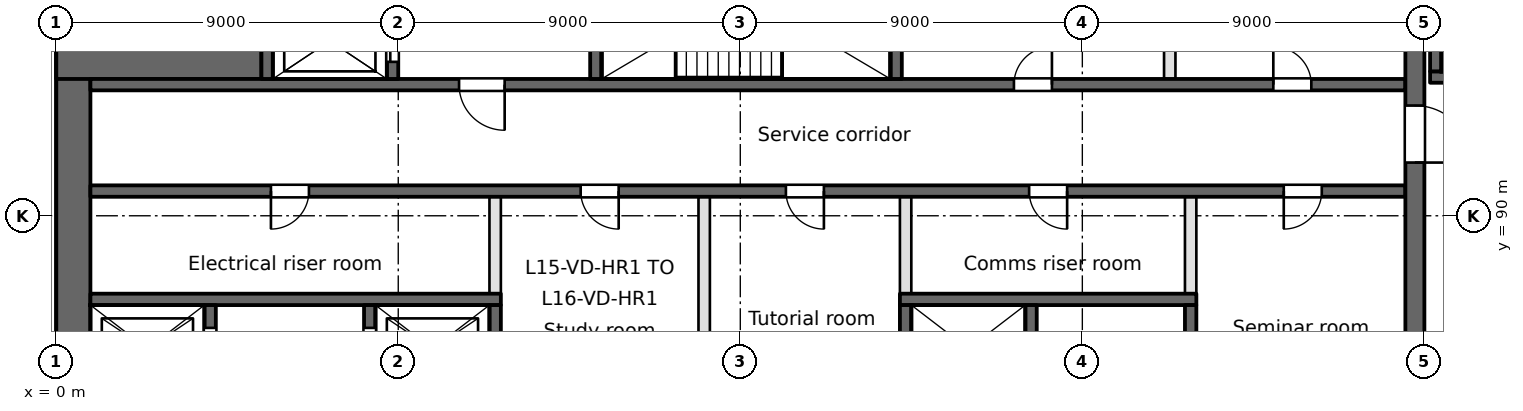
"""IFC4 building model, lengths in metres.
Left out: names, types, materials, properties, quantities, classifications, styles, units other than length and angle.
Written with IfcOpenShell. Run it as: python <this file> out.ifc"""

import sys

from ifc_helpers import new_model, si_unit, direction, frame, frame_2d, origin, place, context, subcontext, project, spatial, rectangle, extrude, element, fill, save


model = new_model("IFC4")
c1 = context("Model", 3, precision=1e-05, world=origin(), true_north=direction((0.0, 1.0)))
c2 = subcontext(c1, "Body", "Model", "MODEL_VIEW")
j1 = project(units=[si_unit("LENGTHUNIT", "METRE"), si_unit("PLANEANGLEUNIT", "RADIAN")], contexts=[c1])
p1 = place(None, origin())
s1 = spatial("IfcSite", under=j1, at=p1, CompositionType="ELEMENT")
p2 = place(p1, origin())
s2 = spatial("IfcBuilding", under=s1, at=p2, CompositionType="ELEMENT")
p3 = place(p2, frame((0.0, 0.0, 65.4)))
s3 = spatial("IfcBuildingStorey", under=s2, at=p3, CompositionType="ELEMENT", Elevation=65.4)
p4 = place(p3, frame((0.45, 94.5, 0.0), z_axis=(0.0, 0.0, 1.0), x_axis=(0.0, -1.0, 0.0)))
e1 = element("IfcWall", 1, at=p4, inside=s3, PredefinedType="SHEAR", context=c2, shape_type="SweptSolid", body=[
    extrude(rectangle(XDim=66.187, YDim=0.9, at=frame_2d((33.094, 0.0))), origin(), (0.0, 0.0, 1.0), 3.7),
])
for number, where, z_axis, x_axis in (
    (2, (4.95, 99.0, 0.0), (0.0, 0.0, 1.0), (0.0, -1.0, 0.0)),
    (3, (5.4, 94.05, 0.0), (0.0, 0.0, 1.0), (-1.0, 0.0, 0.0)),
):
    element("IfcWall", number, at=place(p3, frame(where, z_axis=z_axis, x_axis=x_axis)), inside=s3, PredefinedType="SHEAR", context=c2, shape_type="SweptSolid", body=[
        extrude(rectangle(XDim=5.4, YDim=0.9, at=frame_2d((2.7, 0.0))), origin(), (0.0, 0.0, 1.0), 3.7),
    ])
p5 = place(p3, frame((0.9, 87.8, -0.4), z_axis=(0.0, 0.0, 1.0), x_axis=(1.0, 0.0, 0.0)))
e4 = element("IfcWall", 4, at=p5, inside=s3, PredefinedType="SOLIDWALL", context=c2, shape_type="SweptSolid", body=[
    extrude(rectangle(XDim=10.8, YDim=0.3, at=frame_2d((5.4, 0.0))), origin(), (0.0, 0.0, 1.0), 3.7),
])
p6 = place(p3, frame((22.2, 87.8, -0.4), z_axis=(0.0, 0.0, 1.0), x_axis=(1.0, 0.0, 0.0)))
e5 = element("IfcWall", 5, at=p6, inside=s3, PredefinedType="SOLIDWALL", context=c2, shape_type="SweptSolid", body=[
    extrude(rectangle(XDim=7.8, YDim=0.3, at=frame_2d((3.9, 0.0))), origin(), (0.0, 0.0, 1.0), 3.7),
])
p7 = place(p3, frame((0.9, 90.65, -0.4), z_axis=(0.0, 0.0, 1.0), x_axis=(1.0, 0.0, 0.0)))
e6 = element("IfcWall", 6, at=p7, inside=s3, PredefinedType="SOLIDWALL", context=c2, shape_type="SweptSolid", body=[
    extrude(rectangle(XDim=34.6, YDim=0.3, at=frame_2d((17.3, 0.0))), origin(), (0.0, 0.0, 1.0), 3.7),
])
p8 = place(p7, frame((4.75, 0.0, 0.4)))
e7 = element("IfcOpeningElement", 7, at=p8, cuts=e6, PredefinedType="OPENING", context=c2, shape_type="SweptSolid", body=[
    extrude(rectangle(XDim=1.0, YDim=2.1, at=frame_2d((0.5, 1.05))), frame((0.0, 0.15, 0.0), z_axis=(0.0, -1.0, 0.0), x_axis=(1.0, 0.0, 0.0)), (0.0, 0.0, 1.0), 0.3),
])
p9 = place(p7, frame((24.7, 0.0, 0.4)))
e8 = element("IfcOpeningElement", 8, at=p9, cuts=e6, PredefinedType="OPENING", context=c2, shape_type="SweptSolid", body=[
    extrude(rectangle(XDim=1.0, YDim=2.1, at=frame_2d((0.5, 1.05))), frame((0.0, 0.15, 0.0), z_axis=(0.0, -1.0, 0.0), x_axis=(1.0, 0.0, 0.0)), (0.0, 0.0, 1.0), 0.3),
])
p10 = place(p7, frame((12.9, 0.0, 0.4)))
e9 = element("IfcOpeningElement", 9, at=p10, cuts=e6, PredefinedType="OPENING", context=c2, shape_type="SweptSolid", body=[
    extrude(rectangle(XDim=1.0, YDim=2.1, at=frame_2d((0.5, 1.05))), frame((0.0, 0.15, 0.0), z_axis=(0.0, -1.0, 0.0), x_axis=(1.0, 0.0, 0.0)), (0.0, 0.0, 1.0), 0.3),
])
p11 = place(p7, frame((18.3, 0.0, 0.4)))
e10 = element("IfcOpeningElement", 10, at=p11, cuts=e6, PredefinedType="OPENING", context=c2, shape_type="SweptSolid", body=[
    extrude(rectangle(XDim=1.0, YDim=2.1, at=frame_2d((0.5, 1.05))), frame((0.0, 0.15, 0.0), z_axis=(0.0, -1.0, 0.0), x_axis=(1.0, 0.0, 0.0)), (0.0, 0.0, 1.0), 0.3),
])
p12 = place(p7, frame((31.4, 0.0, 0.4)))
e11 = element("IfcOpeningElement", 11, at=p12, cuts=e6, PredefinedType="OPENING", context=c2, shape_type="SweptSolid", body=[
    extrude(rectangle(XDim=1.0, YDim=2.1, at=frame_2d((0.5, 1.05))), frame((0.0, 0.15, 0.0), z_axis=(0.0, -1.0, 0.0), x_axis=(1.0, 0.0, 0.0)), (0.0, 0.0, 1.0), 0.3),
])
p13 = place(p3, frame((0.9, 93.45, -0.4), z_axis=(0.0, 0.0, 1.0), x_axis=(1.0, 0.0, 0.0)))
e12 = element("IfcWall", 12, at=p13, inside=s3, PredefinedType="SOLIDWALL", context=c2, shape_type="SweptSolid", body=[
    extrude(rectangle(XDim=34.6, YDim=0.3, at=frame_2d((17.3, 0.0))), origin(), (0.0, 0.0, 1.0), 3.7),
])
p14 = place(p13, frame((9.7, 0.0, 0.4)))
e13 = element("IfcOpeningElement", 13, at=p14, cuts=e12, PredefinedType="OPENING", context=c2, shape_type="SweptSolid", body=[
    extrude(rectangle(XDim=1.2, YDim=2.1, at=frame_2d((0.6, 1.05))), frame((0.0, 0.15, 0.0), z_axis=(0.0, -1.0, 0.0), x_axis=(1.0, 0.0, 0.0)), (0.0, 0.0, 1.0), 0.3),
])
p15 = place(p13, frame((24.3, 0.0, 0.4)))
e14 = element("IfcOpeningElement", 14, at=p15, cuts=e12, PredefinedType="OPENING", context=c2, shape_type="SweptSolid", body=[
    extrude(rectangle(XDim=1.0, YDim=2.1, at=frame_2d((0.5, 1.05))), frame((0.0, 0.15, 0.0), z_axis=(0.0, -1.0, 0.0), x_axis=(1.0, 0.0, 0.0)), (0.0, 0.0, 1.0), 0.3),
])
p16 = place(p13, frame((31.125, 0.0, 0.4)))
e15 = element("IfcOpeningElement", 15, at=p16, cuts=e12, PredefinedType="OPENING", context=c2, shape_type="SweptSolid", body=[
    extrude(rectangle(XDim=1.0, YDim=2.1, at=frame_2d((0.5, 1.05))), frame((0.0, 0.15, 0.0), z_axis=(0.0, -1.0, 0.0), x_axis=(1.0, 0.0, 0.0)), (0.0, 0.0, 1.0), 0.3),
])
p17 = place(p3, frame((36.15, 93.65, -0.4), z_axis=(0.0, 0.0, 1.0), x_axis=(1.0, 0.0, 0.0)))
e16 = element("IfcWall", 16, at=p17, inside=s3, PredefinedType="SOLIDWALL", context=c2, shape_type="SweptSolid", body=[
    extrude(rectangle(XDim=8.2, YDim=0.3, at=frame_2d((4.1, 0.0))), origin(), (0.0, 0.0, 1.0), 3.7),
])
p18 = place(p17, frame((0.7, 0.0, 0.4)))
e17 = element("IfcOpeningElement", 17, at=p18, cuts=e16, PredefinedType="OPENING", context=c2, shape_type="SweptSolid", body=[
    extrude(rectangle(XDim=1.2, YDim=2.1, at=frame_2d((0.6, 1.05))), frame((0.0, 0.15, 0.0), z_axis=(0.0, -1.0, 0.0), x_axis=(1.0, 0.0, 0.0)), (0.0, 0.0, 1.0), 0.3),
])
p19 = place(p3, frame((4.05, 77.55, -0.4), z_axis=(0.0, 0.0, 1.0), x_axis=(0.0, 1.0, 0.0)))
e18 = element("IfcWall", 18, at=p19, inside=s3, PredefinedType="SOLIDWALL", context=c2, shape_type="SweptSolid", body=[
    extrude(rectangle(XDim=10.1, YDim=0.3, at=frame_2d((5.05, 0.0))), origin(), (0.0, 0.0, 1.0), 3.7),
])
p20 = place(p19, frame((0.6, 0.0, 0.4)))
e19 = element("IfcOpeningElement", 19, at=p20, cuts=e18, PredefinedType="OPENING", context=c2, shape_type="SweptSolid", body=[
    extrude(rectangle(XDim=1.1, YDim=2.1, at=frame_2d((0.55, 1.05))), frame((0.0, 0.15, 0.0), z_axis=(0.0, -1.0, 0.0), x_axis=(1.0, 0.0, 0.0)), (0.0, 0.0, 1.0), 0.3),
])
p21 = place(p19, frame((3.2, 0.0, 0.4)))
e20 = element("IfcOpeningElement", 20, at=p21, cuts=e18, PredefinedType="OPENING", context=c2, shape_type="SweptSolid", body=[
    extrude(rectangle(XDim=1.1, YDim=2.1, at=frame_2d((0.55, 1.05))), frame((0.0, 0.15, 0.0), z_axis=(0.0, -1.0, 0.0), x_axis=(1.0, 0.0, 0.0)), (0.0, 0.0, 1.0), 0.3),
])
p22 = place(p19, frame((5.8, 0.0, 0.4)))
e21 = element("IfcOpeningElement", 21, at=p22, cuts=e18, PredefinedType="OPENING", context=c2, shape_type="SweptSolid", body=[
    extrude(rectangle(XDim=1.1, YDim=2.1, at=frame_2d((0.55, 1.05))), frame((0.0, 0.15, 0.0), z_axis=(0.0, -1.0, 0.0), x_axis=(1.0, 0.0, 0.0)), (0.0, 0.0, 1.0), 0.3),
])
p23 = place(p19, frame((8.4, 0.0, 0.4)))
e22 = element("IfcOpeningElement", 22, at=p23, cuts=e18, PredefinedType="OPENING", context=c2, shape_type="SweptSolid", body=[
    extrude(rectangle(XDim=1.1, YDim=2.1, at=frame_2d((0.55, 1.05))), frame((0.0, 0.15, 0.0), z_axis=(0.0, -1.0, 0.0), x_axis=(1.0, 0.0, 0.0)), (0.0, 0.0, 1.0), 0.3),
])
p24 = place(p3, frame((5.55, 93.6, -0.4), z_axis=(0.0, 0.0, 1.0), x_axis=(0.0, 1.0, 0.0)))
e23 = element("IfcWall", 23, at=p24, inside=s3, PredefinedType="SOLIDWALL", context=c2, shape_type="SweptSolid", body=[
    extrude(rectangle(XDim=4.5, YDim=0.3, at=frame_2d((2.25, 0.0))), origin(), (0.0, 0.0, 1.0), 3.7),
])
p25 = place(p3, frame((8.25, 77.55, -0.4), z_axis=(0.0, 0.0, 1.0), x_axis=(0.0, 1.0, 0.0)))
e24 = element("IfcWall", 24, at=p25, inside=s3, PredefinedType="SOLIDWALL", context=c2, shape_type="SweptSolid", body=[
    extrude(rectangle(XDim=10.1, YDim=0.3, at=frame_2d((5.05, 0.0))), origin(), (0.0, 0.0, 1.0), 3.7),
])
p26 = place(p25, frame((0.6, 0.0, 0.4)))
e25 = element("IfcOpeningElement", 25, at=p26, cuts=e24, PredefinedType="OPENING", context=c2, shape_type="SweptSolid", body=[
    extrude(rectangle(XDim=1.1, YDim=2.1, at=frame_2d((0.55, 1.05))), frame((0.0, 0.15, 0.0), z_axis=(0.0, -1.0, 0.0), x_axis=(1.0, 0.0, 0.0)), (0.0, 0.0, 1.0), 0.3),
])
p27 = place(p25, frame((3.2, 0.0, 0.4)))
e26 = element("IfcOpeningElement", 26, at=p27, cuts=e24, PredefinedType="OPENING", context=c2, shape_type="SweptSolid", body=[
    extrude(rectangle(XDim=1.1, YDim=2.1, at=frame_2d((0.55, 1.05))), frame((0.0, 0.15, 0.0), z_axis=(0.0, -1.0, 0.0), x_axis=(1.0, 0.0, 0.0)), (0.0, 0.0, 1.0), 0.3),
])
p28 = place(p25, frame((5.8, 0.0, 0.4)))
e27 = element("IfcOpeningElement", 27, at=p28, cuts=e24, PredefinedType="OPENING", context=c2, shape_type="SweptSolid", body=[
    extrude(rectangle(XDim=1.1, YDim=2.1, at=frame_2d((0.55, 1.05))), frame((0.0, 0.15, 0.0), z_axis=(0.0, -1.0, 0.0), x_axis=(1.0, 0.0, 0.0)), (0.0, 0.0, 1.0), 0.3),
])
p29 = place(p25, frame((8.4, 0.0, 0.4)))
e28 = element("IfcOpeningElement", 28, at=p29, cuts=e24, PredefinedType="OPENING", context=c2, shape_type="SweptSolid", body=[
    extrude(rectangle(XDim=1.1, YDim=2.1, at=frame_2d((0.55, 1.05))), frame((0.0, 0.15, 0.0), z_axis=(0.0, -1.0, 0.0), x_axis=(1.0, 0.0, 0.0)), (0.0, 0.0, 1.0), 0.3),
])
p30 = place(p3, frame((8.85, 93.6, -0.4), z_axis=(0.0, 0.0, 1.0), x_axis=(0.0, 1.0, 0.0)))
e29 = element("IfcWall", 29, at=p30, inside=s3, PredefinedType="SOLIDWALL", context=c2, shape_type="SweptSolid", body=[
    extrude(rectangle(XDim=4.5, YDim=0.3, at=frame_2d((2.25, 0.0))), origin(), (0.0, 0.0, 1.0), 3.7),
])
p31 = place(p30, frame((0.45, 0.0, 0.4)))
e30 = element("IfcOpeningElement", 30, at=p31, cuts=e29, PredefinedType="OPENING", context=c2, shape_type="SweptSolid", body=[
    extrude(rectangle(XDim=1.1, YDim=2.1, at=frame_2d((0.55, 1.05))), frame((0.0, 0.15, 0.0), z_axis=(0.0, -1.0, 0.0), x_axis=(1.0, 0.0, 0.0)), (0.0, 0.0, 1.0), 0.3),
])
p32 = place(p30, frame((2.85, 0.0, 0.4)))
e31 = element("IfcOpeningElement", 31, at=p32, cuts=e29, PredefinedType="OPENING", context=c2, shape_type="SweptSolid", body=[
    extrude(rectangle(XDim=1.1, YDim=2.1, at=frame_2d((0.55, 1.05))), frame((0.0, 0.15, 0.0), z_axis=(0.0, -1.0, 0.0), x_axis=(1.0, 0.0, 0.0)), (0.0, 0.0, 1.0), 0.3),
])
p33 = place(p3, frame((11.55, 77.55, -0.4), z_axis=(0.0, 0.0, 1.0), x_axis=(0.0, 1.0, 0.0)))
e32 = element("IfcWall", 32, at=p33, inside=s3, PredefinedType="SOLIDWALL", context=c2, shape_type="SweptSolid", body=[
    extrude(rectangle(XDim=10.1, YDim=0.3, at=frame_2d((5.05, 0.0))), origin(), (0.0, 0.0, 1.0), 3.7),
])
p34 = place(p3, frame((11.55, 87.95, 0.0), z_axis=(0.0, 0.0, 1.0), x_axis=(0.0, 1.0, 0.0)))
e33 = element("IfcWall", 33, at=p34, inside=s3, PredefinedType="PARTITIONING", context=c2, shape_type="SweptSolid", body=[
    extrude(rectangle(XDim=2.55, YDim=0.3, at=frame_2d((1.275, 0.0))), origin(), (0.0, 0.0, 1.0), 3.3),
])
p35 = place(p3, frame((14.2, 93.6, -0.4), z_axis=(0.0, 0.0, 1.0), x_axis=(0.0, 1.0, 0.0)))
e34 = element("IfcWall", 34, at=p35, inside=s3, PredefinedType="SOLIDWALL", context=c2, shape_type="SweptSolid", body=[
    extrude(rectangle(XDim=4.5, YDim=0.3, at=frame_2d((2.25, 0.0))), origin(), (0.0, 0.0, 1.0), 3.7),
])
p36 = place(p35, frame((1.8, 0.0, 0.4)))
e35 = element("IfcOpeningElement", 35, at=p36, cuts=e34, PredefinedType="OPENING", context=c2, shape_type="SweptSolid", body=[
    extrude(rectangle(XDim=1.2, YDim=2.1, at=frame_2d((0.6, 1.05))), frame((0.0, 0.15, 0.0), z_axis=(0.0, -1.0, 0.0), x_axis=(1.0, 0.0, 0.0)), (0.0, 0.0, 1.0), 0.3),
])
p37 = place(p3, frame((17.05, 77.55, 0.0), z_axis=(0.0, 0.0, 1.0), x_axis=(0.0, 1.0, 0.0)))
e36 = element("IfcWall", 36, at=p37, inside=s3, PredefinedType="PARTITIONING", context=c2, shape_type="SweptSolid", body=[
    extrude(rectangle(XDim=12.95, YDim=0.3, at=frame_2d((6.475, 0.0))), origin(), (0.0, 0.0, 1.0), 3.3),
])
p38 = place(p3, frame((22.1, 93.6, -0.4), z_axis=(0.0, 0.0, 1.0), x_axis=(0.0, 1.0, 0.0)))
e37 = element("IfcWall", 37, at=p38, inside=s3, PredefinedType="SOLIDWALL", context=c2, shape_type="SweptSolid", body=[
    extrude(rectangle(XDim=4.5, YDim=0.3, at=frame_2d((2.25, 0.0))), origin(), (0.0, 0.0, 1.0), 3.7),
])
p39 = place(p3, frame((22.35, 77.55, -0.4), z_axis=(0.0, 0.0, 1.0), x_axis=(0.0, 1.0, 0.0)))
e38 = element("IfcWall", 38, at=p39, inside=s3, PredefinedType="SOLIDWALL", context=c2, shape_type="SweptSolid", body=[
    extrude(rectangle(XDim=10.1, YDim=0.3, at=frame_2d((5.05, 0.0))), origin(), (0.0, 0.0, 1.0), 3.7),
])
p40 = place(p3, frame((22.35, 87.95, 0.0), z_axis=(0.0, 0.0, 1.0), x_axis=(0.0, 1.0, 0.0)))
e39 = element("IfcWall", 39, at=p40, inside=s3, PredefinedType="PARTITIONING", context=c2, shape_type="SweptSolid", body=[
    extrude(rectangle(XDim=2.55, YDim=0.3, at=frame_2d((1.275, 0.0))), origin(), (0.0, 0.0, 1.0), 3.3),
])
p41 = place(p3, frame((25.65, 77.55, -0.4), z_axis=(0.0, 0.0, 1.0), x_axis=(0.0, 1.0, 0.0)))
e40 = element("IfcWall", 40, at=p41, inside=s3, PredefinedType="SOLIDWALL", context=c2, shape_type="SweptSolid", body=[
    extrude(rectangle(XDim=10.1, YDim=0.3, at=frame_2d((5.05, 0.0))), origin(), (0.0, 0.0, 1.0), 3.7),
])
p42 = place(p3, frame((29.3, 93.6, 0.0), z_axis=(0.0, 0.0, 1.0), x_axis=(0.0, 1.0, 0.0)))
e41 = element("IfcWall", 41, at=p42, inside=s3, PredefinedType="PARTITIONING", context=c2, shape_type="SweptSolid", body=[
    extrude(rectangle(XDim=4.5, YDim=0.3, at=frame_2d((2.25, 0.0))), origin(), (0.0, 0.0, 1.0), 3.3),
])
p43 = place(p3, frame((29.85, 77.55, -0.4), z_axis=(0.0, 0.0, 1.0), x_axis=(0.0, 1.0, 0.0)))
e42 = element("IfcWall", 42, at=p43, inside=s3, PredefinedType="SOLIDWALL", context=c2, shape_type="SweptSolid", body=[
    extrude(rectangle(XDim=10.1, YDim=0.3, at=frame_2d((5.05, 0.0))), origin(), (0.0, 0.0, 1.0), 3.7),
])
p44 = place(p3, frame((29.85, 87.95, 0.0), z_axis=(0.0, 0.0, 1.0), x_axis=(0.0, 1.0, 0.0)))
e43 = element("IfcWall", 43, at=p44, inside=s3, PredefinedType="PARTITIONING", context=c2, shape_type="SweptSolid", body=[
    extrude(rectangle(XDim=2.55, YDim=0.3, at=frame_2d((1.275, 0.0))), origin(), (0.0, 0.0, 1.0), 3.3),
])
p45 = place(p3, frame((35.75, 63.5, -0.4), z_axis=(0.0, 0.0, 1.0), x_axis=(0.0, 1.0, 0.0)))
e44 = element("IfcWall", 44, at=p45, inside=s3, PredefinedType="SOLIDWALL", context=c2, shape_type="SweptSolid", body=[
    extrude(rectangle(XDim=34.6, YDim=0.5, at=frame_2d((17.3, 0.0))), origin(), (0.0, 0.0, 1.0), 3.7),
])
p46 = place(p45, frame((9.7, 0.0, 0.4)))
e45 = element("IfcOpeningElement", 45, at=p46, cuts=e44, PredefinedType="OPENING", context=c2, shape_type="SweptSolid", body=[
    extrude(rectangle(XDim=2.4, YDim=2.1, at=frame_2d((1.2, 1.05))), frame((0.0, 0.25, 0.0), z_axis=(0.0, -1.0, 0.0), x_axis=(1.0, 0.0, 0.0)), (0.0, 0.0, 1.0), 0.5),
])
p47 = place(p45, frame((27.9, 0.0, 0.4)))
e46 = element("IfcOpeningElement", 46, at=p47, cuts=e44, PredefinedType="OPENING", context=c2, shape_type="SweptSolid", body=[
    extrude(rectangle(XDim=1.5, YDim=2.1, at=frame_2d((0.75, 1.05))), frame((0.0, 0.25, 0.0), z_axis=(0.0, -1.0, 0.0), x_axis=(1.0, 0.0, 0.0)), (0.0, 0.0, 1.0), 0.5),
])
p48 = place(p45, frame((1.5, 0.0, 0.4)))
e47 = element("IfcOpeningElement", 47, at=p48, cuts=e44, PredefinedType="OPENING", context=c2, shape_type="SweptSolid", body=[
    extrude(rectangle(XDim=1.2, YDim=2.1, at=frame_2d((0.6, 1.05))), frame((0.0, 0.25, 0.0), z_axis=(0.0, -1.0, 0.0), x_axis=(1.0, 0.0, 0.0)), (0.0, 0.0, 1.0), 0.5),
])
p49 = place(p3, frame((36.3, 93.8, -0.4), z_axis=(0.0, 0.0, 1.0), x_axis=(0.0, 1.0, 0.0)))
e48 = element("IfcWall", 48, at=p49, inside=s3, PredefinedType="SOLIDWALL", context=c2, shape_type="SweptSolid", body=[
    extrude(rectangle(XDim=4.3, YDim=0.3, at=frame_2d((2.15, 0.0))), origin(), (0.0, 0.0, 1.0), 3.7),
])
p50 = place(p23, origin())
e49 = element("IfcDoor", 49, at=p50, inside=s3, OperationType="SLIDING_TO_LEFT", PredefinedType="DOOR", context=c2, shape_type="SweptSolid", body=[
    extrude(rectangle(XDim=1.1, YDim=2.1, at=frame_2d((0.55, 1.05))), frame((0.0, 0.025, 0.0), z_axis=(0.0, -1.0, 0.0), x_axis=(1.0, 0.0, 0.0)), (0.0, 0.0, 1.0), 0.05),
])
fill(e22, e49)
p51 = place(p29, origin())
e50 = element("IfcDoor", 50, at=p51, inside=s3, OperationType="SLIDING_TO_LEFT", PredefinedType="DOOR", context=c2, shape_type="SweptSolid", body=[
    extrude(rectangle(XDim=1.1, YDim=2.1, at=frame_2d((0.55, 1.05))), frame((0.0, 0.025, 0.0), z_axis=(0.0, -1.0, 0.0), x_axis=(1.0, 0.0, 0.0)), (0.0, 0.0, 1.0), 0.05),
])
fill(e28, e50)
p52 = place(p31, origin())
e51 = element("IfcDoor", 51, at=p52, inside=s3, OperationType="SLIDING_TO_RIGHT", PredefinedType="DOOR", context=c2, shape_type="SweptSolid", body=[
    extrude(rectangle(XDim=1.1, YDim=2.1, at=frame_2d((0.55, 1.05))), frame((0.0, 0.025, 0.0), z_axis=(0.0, -1.0, 0.0), x_axis=(1.0, 0.0, 0.0)), (0.0, 0.0, 1.0), 0.05),
])
fill(e30, e51)
p53 = place(p14, frame((1.2, 0.0, 0.0), z_axis=(0.0, 0.0, 1.0), x_axis=(-1.0, 0.0, 0.0)))
e52 = element("IfcDoor", 52, at=p53, inside=s3, OperationType="SINGLE_SWING_LEFT", PredefinedType="DOOR", context=c2, shape_type="SweptSolid", body=[
    extrude(rectangle(XDim=1.2, YDim=2.1, at=frame_2d((0.6, 1.05))), frame((0.0, 0.025, 0.0), z_axis=(0.0, -1.0, 0.0), x_axis=(1.0, 0.0, 0.0)), (0.0, 0.0, 1.0), 0.05),
])
fill(e13, e52)
p54 = place(p47, frame((1.5, 0.0, 0.0), z_axis=(0.0, 0.0, 1.0), x_axis=(-1.0, 0.0, 0.0)))
e53 = element("IfcDoor", 53, at=p54, inside=s3, OperationType="SINGLE_SWING_RIGHT", PredefinedType="DOOR", context=c2, shape_type="SweptSolid", body=[
    extrude(rectangle(XDim=1.5, YDim=2.1, at=frame_2d((0.75, 1.05))), frame((0.0, 0.025, 0.0), z_axis=(0.0, -1.0, 0.0), x_axis=(1.0, 0.0, 0.0)), (0.0, 0.0, 1.0), 0.05),
])
fill(e46, e53)
p55 = place(p8, frame((1.0, 0.0, 0.0), z_axis=(0.0, 0.0, 1.0), x_axis=(-1.0, 0.0, 0.0)))
e54 = element("IfcDoor", 54, at=p55, inside=s3, OperationType="SINGLE_SWING_RIGHT", PredefinedType="DOOR", context=c2, shape_type="SweptSolid", body=[
    extrude(rectangle(XDim=1.0, YDim=2.1, at=frame_2d((0.5, 1.05))), frame((0.0, 0.025, 0.0), z_axis=(0.0, -1.0, 0.0), x_axis=(1.0, 0.0, 0.0)), (0.0, 0.0, 1.0), 0.05),
])
fill(e7, e54)
p56 = place(p9, frame((1.0, 0.0, 0.0), z_axis=(0.0, 0.0, 1.0), x_axis=(-1.0, 0.0, 0.0)))
e55 = element("IfcDoor", 55, at=p56, inside=s3, OperationType="SINGLE_SWING_LEFT", PredefinedType="DOOR", context=c2, shape_type="SweptSolid", body=[
    extrude(rectangle(XDim=1.0, YDim=2.1, at=frame_2d((0.5, 1.05))), frame((0.0, 0.025, 0.0), z_axis=(0.0, -1.0, 0.0), x_axis=(1.0, 0.0, 0.0)), (0.0, 0.0, 1.0), 0.05),
])
fill(e8, e55)
p57 = place(p10, frame((1.0, 0.0, 0.0), z_axis=(0.0, 0.0, 1.0), x_axis=(-1.0, 0.0, 0.0)))
e56 = element("IfcDoor", 56, at=p57, inside=s3, OperationType="SINGLE_SWING_LEFT", PredefinedType="DOOR", context=c2, shape_type="SweptSolid", body=[
    extrude(rectangle(XDim=1.0, YDim=2.1, at=frame_2d((0.5, 1.05))), frame((0.0, 0.025, 0.0), z_axis=(0.0, -1.0, 0.0), x_axis=(1.0, 0.0, 0.0)), (0.0, 0.0, 1.0), 0.05),
])
fill(e9, e56)
p58 = place(p11, frame((1.0, 0.0, 0.0), z_axis=(0.0, 0.0, 1.0), x_axis=(-1.0, 0.0, 0.0)))
e57 = element("IfcDoor", 57, at=p58, inside=s3, OperationType="SINGLE_SWING_LEFT", PredefinedType="DOOR", context=c2, shape_type="SweptSolid", body=[
    extrude(rectangle(XDim=1.0, YDim=2.1, at=frame_2d((0.5, 1.05))), frame((0.0, 0.025, 0.0), z_axis=(0.0, -1.0, 0.0), x_axis=(1.0, 0.0, 0.0)), (0.0, 0.0, 1.0), 0.05),
])
fill(e10, e57)
p59 = place(p12, frame((1.0, 0.0, 0.0), z_axis=(0.0, 0.0, 1.0), x_axis=(-1.0, 0.0, 0.0)))
e58 = element("IfcDoor", 58, at=p59, inside=s3, OperationType="SINGLE_SWING_RIGHT", PredefinedType="DOOR", context=c2, shape_type="SweptSolid", body=[
    extrude(rectangle(XDim=1.0, YDim=2.1, at=frame_2d((0.5, 1.05))), frame((0.0, 0.025, 0.0), z_axis=(0.0, -1.0, 0.0), x_axis=(1.0, 0.0, 0.0)), (0.0, 0.0, 1.0), 0.05),
])
fill(e11, e58)
p60 = place(p15, origin())
e59 = element("IfcDoor", 59, at=p60, inside=s3, OperationType="SINGLE_SWING_RIGHT", PredefinedType="DOOR", context=c2, shape_type="SweptSolid", body=[
    extrude(rectangle(XDim=1.0, YDim=2.1, at=frame_2d((0.5, 1.05))), frame((0.0, 0.025, 0.0), z_axis=(0.0, -1.0, 0.0), x_axis=(1.0, 0.0, 0.0)), (0.0, 0.0, 1.0), 0.05),
])
fill(e14, e59)
p61 = place(p16, origin())
e60 = element("IfcDoor", 60, at=p61, inside=s3, OperationType="SINGLE_SWING_LEFT", PredefinedType="DOOR", context=c2, shape_type="SweptSolid", body=[
    extrude(rectangle(XDim=1.0, YDim=2.1, at=frame_2d((0.5, 1.05))), frame((0.0, 0.025, 0.0), z_axis=(0.0, -1.0, 0.0), x_axis=(1.0, 0.0, 0.0)), (0.0, 0.0, 1.0), 0.05),
])
fill(e15, e60)
save(model, sys.argv[1])
